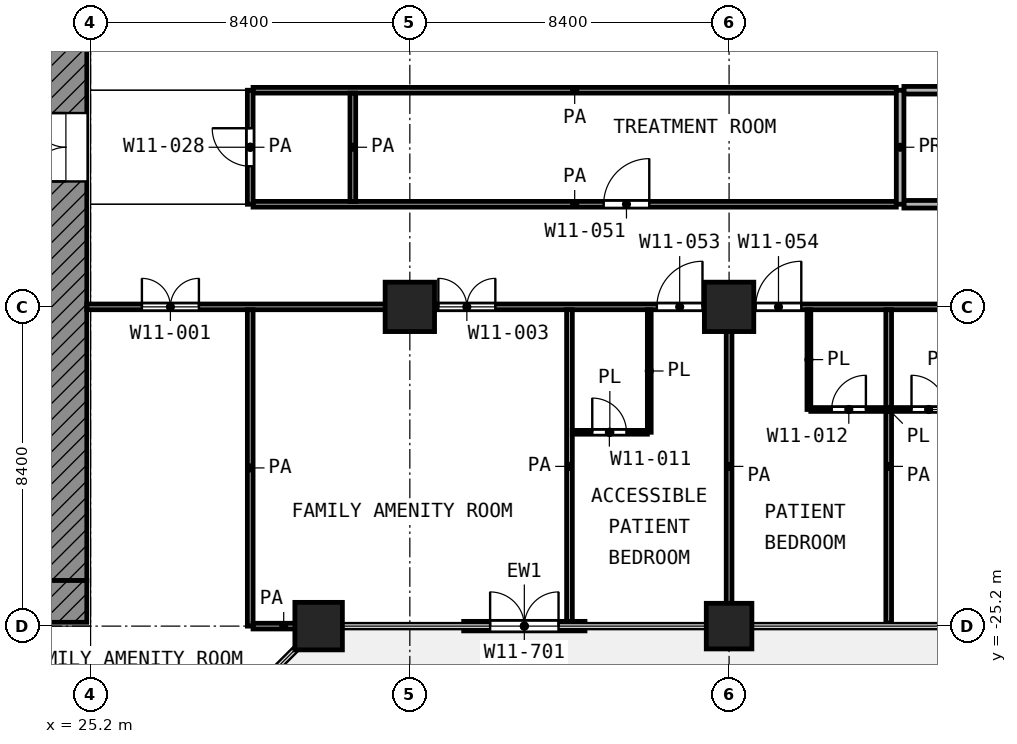
"""IFC4 building model, lengths in metres.
Left out: names, types, materials, properties, quantities, classifications, styles, units other than length and angle.
Written with IfcOpenShell. Run it as: python <this file> out.ifc"""

import sys

from ifc_helpers import new_model, si_unit, direction, frame, frame_2d, origin, origin_2d, place, context, subcontext, project, spatial, rectangle, extrude, element, fill, save


model = new_model("IFC4")
c1 = context("Model", 3, precision=1e-05, world=origin(), true_north=direction((0.0, 1.0)))
c2 = subcontext(c1, "Body", "Model", "MODEL_VIEW")
j1 = project(units=[si_unit("LENGTHUNIT", "METRE"), si_unit("PLANEANGLEUNIT", "RADIAN")], contexts=[c1])
p1 = place(None, origin())
s1 = spatial("IfcSite", under=j1, at=p1, CompositionType="ELEMENT")
p2 = place(p1, origin())
s2 = spatial("IfcBuilding", under=s1, at=p2, CompositionType="ELEMENT")
p3 = place(p2, frame((0.0, 0.0, 72.8)))
s3 = spatial("IfcBuildingStorey", under=s2, at=p3, CompositionType="ELEMENT", Elevation=72.8)
for number, where, z_axis, x_axis in (
    (1, (33.6, -16.8, 0.0), (0.0, 0.0, 1.0), (1.0, 0.0, 0.0)),
    (2, (42.0, -16.8, 0.0), (0.0, 0.0, 1.0), (1.0, 0.0, 0.0)),
):
    element("IfcColumn", number, at=place(p3, frame(where, z_axis=z_axis, x_axis=x_axis)), inside=s3, PredefinedType="COLUMN", context=c2, shape_type="SweptSolid", body=[
        extrude(rectangle(XDim=1.3, YDim=1.3, at=origin_2d()), origin(), (0.0, 0.0, 1.0), 4.2),
    ])
p4 = place(p3, frame((31.2, -25.2, 0.0), z_axis=(0.0, 0.0, 1.0), x_axis=(1.0, 0.0, 0.0)))
e3 = element("IfcColumn", 3, at=p4, inside=s3, PredefinedType="COLUMN", context=c2, shape_type="SweptSolid", body=[
    extrude(rectangle(XDim=1.25, YDim=1.25, at=origin_2d()), origin(), (0.0, 0.0, 1.0), 4.2),
])
p5 = place(p3, frame((42.0, -25.2, 0.0), z_axis=(0.0, 0.0, 1.0), x_axis=(1.0, 0.0, 0.0)))
e4 = element("IfcColumn", 4, at=p5, inside=s3, PredefinedType="COLUMN", context=c2, shape_type="SweptSolid", body=[
    extrude(rectangle(XDim=1.2, YDim=1.2, at=origin_2d()), origin(), (0.0, 0.0, 1.0), 4.2),
])
p6 = place(p3, frame((35.017, -25.2, 0.0), z_axis=(0.0, 0.0, 1.0), x_axis=(1.0, 0.0, 0.0)))
e5 = element("IfcWall", 5, at=p6, inside=s3, PredefinedType="SOLIDWALL", context=c2, shape_type="SweptSolid", body=[
    extrude(rectangle(XDim=3.192, YDim=0.25, at=frame_2d((1.596, 0.0))), origin(), (0.0, 0.0, 1.0), 3.78),
])
p7 = place(p6, frame((0.696, 0.0, 0.0)))
e6 = element("IfcOpeningElement", 6, at=p7, cuts=e5, PredefinedType="OPENING", context=c2, shape_type="SweptSolid", body=[
    extrude(rectangle(XDim=1.8, YDim=2.1, at=frame_2d((0.9, 1.05))), frame((0.0, 0.135, 0.0), z_axis=(0.0, -1.0, 0.0), x_axis=(1.0, 0.0, 0.0)), (0.0, 0.0, 1.0), 0.27),
])
p8 = place(p3, frame((24.55, -24.0, 0.0), z_axis=(0.0, 0.0, 1.0), x_axis=(0.0, 1.0, 0.0)))
e7 = element("IfcWall", 7, at=p8, inside=s3, PredefinedType="SHEAR", context=c2, shape_type="SweptSolid", body=[
    extrude(rectangle(XDim=18.6, YDim=1.1, at=frame_2d((9.3, 0.0))), origin(), (0.0, 0.0, 1.0), 3.9),
])
p9 = place(p8, frame((10.5, 0.0, 0.0)))
e8 = element("IfcOpeningElement", 8, at=p9, cuts=e7, PredefinedType="OPENING", context=c2, shape_type="SweptSolid", body=[
    extrude(rectangle(XDim=1.8, YDim=2.1, at=frame_2d((0.9, 1.05))), frame((0.0, 0.56, 0.0), z_axis=(0.0, -1.0, 0.0), x_axis=(1.0, 0.0, 0.0)), (0.0, 0.0, 1.0), 1.12),
])
p10 = place(p3, frame((24.55, -25.1, 0.0), z_axis=(0.0, 0.0, 1.0), x_axis=(0.0, 1.0, 0.0)))
e9 = element("IfcWall", 9, at=p10, inside=s3, PredefinedType="SHEAR", context=c2, shape_type="SweptSolid", body=[
    extrude(rectangle(XDim=1.1, YDim=1.1, at=frame_2d((0.55, 0.0))), origin(), (0.0, 0.0, 1.0), 3.9),
])
p11 = place(p3, frame((37.875, -20.1, 0.0), z_axis=(0.0, 0.0, 1.0), x_axis=(1.0, 0.0, 0.0)))
e10 = element("IfcWall", 10, at=p11, inside=s3, PredefinedType="PARTITIONING", context=c2, shape_type="SweptSolid", body=[
    extrude(rectangle(XDim=1.975, YDim=0.1, at=frame_2d((0.988, 0.0))), origin(), (0.0, 0.0, 1.0), 3.9),
])
p12 = place(p11, frame((0.525, 0.0, 0.0)))
e11 = element("IfcOpeningElement", 11, at=p12, cuts=e10, PredefinedType="OPENING", context=c2, shape_type="SweptSolid", body=[
    extrude(rectangle(XDim=0.9, YDim=2.1, at=frame_2d((0.45, 1.05))), frame((0.0, 0.06, 0.0), z_axis=(0.0, -1.0, 0.0), x_axis=(1.0, 0.0, 0.0)), (0.0, 0.0, 1.0), 0.12),
])
p13 = place(p3, frame((44.15, -19.5, 0.0), z_axis=(0.0, 0.0, 1.0), x_axis=(1.0, 0.0, 0.0)))
e12 = element("IfcWall", 12, at=p13, inside=s3, PredefinedType="PARTITIONING", context=c2, shape_type="SweptSolid", body=[
    extrude(rectangle(XDim=4.1, YDim=0.1, at=frame_2d((2.05, 0.0))), origin(), (0.0, 0.0, 1.0), 3.9),
])
p14 = place(p13, frame((0.55, 0.0, 0.0)))
e13 = element("IfcOpeningElement", 13, at=p14, cuts=e12, PredefinedType="OPENING", context=c2, shape_type="SweptSolid", body=[
    extrude(rectangle(XDim=0.9, YDim=2.1, at=frame_2d((0.45, 1.05))), frame((0.0, 0.06, 0.0), z_axis=(0.0, -1.0, 0.0), x_axis=(1.0, 0.0, 0.0)), (0.0, 0.0, 1.0), 0.12),
])
p15 = place(p13, frame((2.65, 0.0, 0.0)))
e14 = element("IfcOpeningElement", 14, at=p15, cuts=e12, PredefinedType="OPENING", context=c2, shape_type="SweptSolid", body=[
    extrude(rectangle(XDim=0.9, YDim=2.1, at=frame_2d((0.45, 1.05))), frame((0.0, 0.06, 0.0), z_axis=(0.0, -1.0, 0.0), x_axis=(1.0, 0.0, 0.0)), (0.0, 0.0, 1.0), 0.12),
])
p16 = place(p3, frame((39.9, -20.1, 0.0), z_axis=(0.0, 0.0, 1.0), x_axis=(0.0, 1.0, 0.0)))
e15 = element("IfcWall", 15, at=p16, inside=s3, PredefinedType="PARTITIONING", context=c2, shape_type="SweptSolid", body=[
    extrude(rectangle(XDim=3.225, YDim=0.1, at=frame_2d((1.613, 0.0))), origin(), (0.0, 0.0, 1.0), 3.9),
])
p17 = place(p3, frame((44.1, -19.5, 0.0), z_axis=(0.0, 0.0, 1.0), x_axis=(0.0, 1.0, 0.0)))
e16 = element("IfcWall", 16, at=p17, inside=s3, PredefinedType="PARTITIONING", context=c2, shape_type="SweptSolid", body=[
    extrude(rectangle(XDim=2.625, YDim=0.1, at=frame_2d((1.312, 0.0))), origin(), (0.0, 0.0, 1.0), 3.9),
])
p18 = place(p3, frame((29.475, -25.2, 0.0), z_axis=(0.0, 0.0, 1.0), x_axis=(1.0, 0.0, 0.0)))
e17 = element("IfcWall", 17, at=p18, inside=s3, PredefinedType="PARTITIONING", context=c2, shape_type="SweptSolid", body=[
    extrude(rectangle(XDim=1.612, YDim=0.15, at=frame_2d((0.806, 0.0))), origin(), (0.0, 0.0, 1.0), 3.9),
])
p19 = place(p3, frame((25.1, -16.8, 0.0), z_axis=(0.0, 0.0, 1.0), x_axis=(1.0, 0.0, 0.0)))
e18 = element("IfcWall", 18, at=p19, inside=s3, PredefinedType="PARTITIONING", context=c2, shape_type="SweptSolid", body=[
    extrude(rectangle(XDim=54.62, YDim=0.15, at=frame_2d((27.31, 0.0))), origin(), (0.0, 0.0, 1.0), 3.9),
])
p20 = place(p19, frame((1.45, 0.0, 0.0)))
e19 = element("IfcOpeningElement", 19, at=p20, cuts=e18, PredefinedType="OPENING", context=c2, shape_type="SweptSolid", body=[
    extrude(rectangle(XDim=1.5, YDim=2.1, at=frame_2d((0.75, 1.05))), frame((0.0, 0.085, 0.0), z_axis=(0.0, -1.0, 0.0), x_axis=(1.0, 0.0, 0.0)), (0.0, 0.0, 1.0), 0.17),
])
p21 = place(p19, frame((9.25, 0.0, 0.0)))
e20 = element("IfcOpeningElement", 20, at=p21, cuts=e18, PredefinedType="OPENING", context=c2, shape_type="SweptSolid", body=[
    extrude(rectangle(XDim=1.5, YDim=2.1, at=frame_2d((0.75, 1.05))), frame((0.0, 0.085, 0.0), z_axis=(0.0, -1.0, 0.0), x_axis=(1.0, 0.0, 0.0)), (0.0, 0.0, 1.0), 0.17),
])
p22 = place(p19, frame((15.0, 0.0, 0.0)))
e21 = element("IfcOpeningElement", 21, at=p22, cuts=e18, PredefinedType="OPENING", context=c2, shape_type="SweptSolid", body=[
    extrude(rectangle(XDim=1.2, YDim=2.1, at=frame_2d((0.6, 1.05))), frame((0.0, 0.085, 0.0), z_axis=(0.0, -1.0, 0.0), x_axis=(1.0, 0.0, 0.0)), (0.0, 0.0, 1.0), 0.17),
])
p23 = place(p19, frame((17.6, 0.0, 0.0)))
e22 = element("IfcOpeningElement", 22, at=p23, cuts=e18, PredefinedType="OPENING", context=c2, shape_type="SweptSolid", body=[
    extrude(rectangle(XDim=1.2, YDim=2.1, at=frame_2d((0.6, 1.05))), frame((0.0, 0.085, 0.0), z_axis=(0.0, -1.0, 0.0), x_axis=(1.0, 0.0, 0.0)), (0.0, 0.0, 1.0), 0.17),
])
p24 = place(p19, frame((26.2, 0.0, 0.0)))
e23 = element("IfcOpeningElement", 23, at=p24, cuts=e18, PredefinedType="OPENING", context=c2, shape_type="SweptSolid", body=[
    extrude(rectangle(XDim=1.2, YDim=2.1, at=frame_2d((0.6, 1.05))), frame((0.0, 0.085, 0.0), z_axis=(0.0, -1.0, 0.0), x_axis=(1.0, 0.0, 0.0)), (0.0, 0.0, 1.0), 0.17),
])
p25 = place(p19, frame((23.4, 0.0, 0.0)))
e24 = element("IfcOpeningElement", 24, at=p25, cuts=e18, PredefinedType="OPENING", context=c2, shape_type="SweptSolid", body=[
    extrude(rectangle(XDim=1.2, YDim=2.1, at=frame_2d((0.6, 1.05))), frame((0.0, 0.085, 0.0), z_axis=(0.0, -1.0, 0.0), x_axis=(1.0, 0.0, 0.0)), (0.0, 0.0, 1.0), 0.17),
])
p26 = place(p19, frame((28.45, 0.0, 0.0)))
e25 = element("IfcOpeningElement", 25, at=p26, cuts=e18, PredefinedType="OPENING", context=c2, shape_type="SweptSolid", body=[
    extrude(rectangle(XDim=1.2, YDim=2.1, at=frame_2d((0.6, 1.05))), frame((0.0, 0.085, 0.0), z_axis=(0.0, -1.0, 0.0), x_axis=(1.0, 0.0, 0.0)), (0.0, 0.0, 1.0), 0.17),
])
p27 = place(p19, frame((31.8, 0.0, 0.0)))
e26 = element("IfcOpeningElement", 26, at=p27, cuts=e18, PredefinedType="OPENING", context=c2, shape_type="SweptSolid", body=[
    extrude(rectangle(XDim=1.2, YDim=2.1, at=frame_2d((0.6, 1.05))), frame((0.0, 0.085, 0.0), z_axis=(0.0, -1.0, 0.0), x_axis=(1.0, 0.0, 0.0)), (0.0, 0.0, 1.0), 0.17),
])
p28 = place(p19, frame((30.35, 0.0, 0.0)))
e27 = element("IfcOpeningElement", 27, at=p28, cuts=e18, PredefinedType="OPENING", context=c2, shape_type="SweptSolid", body=[
    extrude(rectangle(XDim=1.1, YDim=2.1, at=frame_2d((0.55, 1.05))), frame((0.0, 0.085, 0.0), z_axis=(0.0, -1.0, 0.0), x_axis=(1.0, 0.0, 0.0)), (0.0, 0.0, 1.0), 0.17),
])
p29 = place(p19, frame((40.2, 0.0, 0.0)))
e28 = element("IfcOpeningElement", 28, at=p29, cuts=e18, PredefinedType="OPENING", context=c2, shape_type="SweptSolid", body=[
    extrude(rectangle(XDim=1.2, YDim=2.1, at=frame_2d((0.6, 1.05))), frame((0.0, 0.085, 0.0), z_axis=(0.0, -1.0, 0.0), x_axis=(1.0, 0.0, 0.0)), (0.0, 0.0, 1.0), 0.17),
])
p30 = place(p19, frame((43.1, 0.0, 0.0)))
e29 = element("IfcOpeningElement", 29, at=p30, cuts=e18, PredefinedType="OPENING", context=c2, shape_type="SweptSolid", body=[
    extrude(rectangle(XDim=1.2, YDim=2.1, at=frame_2d((0.6, 1.05))), frame((0.0, 0.085, 0.0), z_axis=(0.0, -1.0, 0.0), x_axis=(1.0, 0.0, 0.0)), (0.0, 0.0, 1.0), 0.17),
])
p31 = place(p19, frame((51.2, 0.0, 0.0)))
e30 = element("IfcOpeningElement", 30, at=p31, cuts=e18, PredefinedType="OPENING", context=c2, shape_type="SweptSolid", body=[
    extrude(rectangle(XDim=1.5, YDim=2.1, at=frame_2d((0.75, 1.05))), frame((0.0, 0.085, 0.0), z_axis=(0.0, -1.0, 0.0), x_axis=(1.0, 0.0, 0.0)), (0.0, 0.0, 1.0), 0.17),
])
p32 = place(p3, frame((29.475, -14.1, 0.0), z_axis=(0.0, 0.0, 1.0), x_axis=(1.0, 0.0, 0.0)))
e31 = element("IfcWall", 31, at=p32, inside=s3, PredefinedType="PARTITIONING", context=c2, shape_type="SweptSolid", body=[
    extrude(rectangle(XDim=16.925, YDim=0.15, at=frame_2d((8.462, 0.0))), origin(), (0.0, 0.0, 1.0), 3.9),
])
p33 = place(p32, frame((9.225, 0.0, 0.0)))
e32 = element("IfcOpeningElement", 32, at=p33, cuts=e31, PredefinedType="OPENING", context=c2, shape_type="SweptSolid", body=[
    extrude(rectangle(XDim=1.2, YDim=2.1, at=frame_2d((0.6, 1.05))), frame((0.0, 0.085, 0.0), z_axis=(0.0, -1.0, 0.0), x_axis=(1.0, 0.0, 0.0)), (0.0, 0.0, 1.0), 0.17),
])
p34 = place(p3, frame((29.475, -11.1, 0.0), z_axis=(0.0, 0.0, 1.0), x_axis=(1.0, 0.0, 0.0)))
e33 = element("IfcWall", 33, at=p34, inside=s3, PredefinedType="PARTITIONING", context=c2, shape_type="SweptSolid", body=[
    extrude(rectangle(XDim=16.925, YDim=0.15, at=frame_2d((8.462, 0.0))), origin(), (0.0, 0.0, 1.0), 3.9),
])
p35 = place(p3, frame((29.4, -25.2, 0.0), z_axis=(0.0, 0.0, 1.0), x_axis=(0.0, 1.0, 0.0)))
e34 = element("IfcWall", 34, at=p35, inside=s3, PredefinedType="PARTITIONING", context=c2, shape_type="SweptSolid", body=[
    extrude(rectangle(XDim=8.325, YDim=0.15, at=frame_2d((4.163, 0.0))), origin(), (0.0, 0.0, 1.0), 3.9),
])
p36 = place(p3, frame((29.4, -14.1, 0.0), z_axis=(0.0, 0.0, 1.0), x_axis=(0.0, 1.0, 0.0)))
e35 = element("IfcWall", 35, at=p36, inside=s3, PredefinedType="PARTITIONING", context=c2, shape_type="SweptSolid", body=[
    extrude(rectangle(XDim=3.0, YDim=0.15, at=frame_2d((1.5, 0.0))), origin(), (0.0, 0.0, 1.0), 3.9),
])
p37 = place(p36, frame((1.0, 0.0, 0.0)))
e36 = element("IfcOpeningElement", 36, at=p37, cuts=e35, PredefinedType="OPENING", context=c2, shape_type="SweptSolid", body=[
    extrude(rectangle(XDim=1.0, YDim=2.1, at=frame_2d((0.5, 1.05))), frame((0.0, 0.085, 0.0), z_axis=(0.0, -1.0, 0.0), x_axis=(1.0, 0.0, 0.0)), (0.0, 0.0, 1.0), 0.17),
])
p38 = place(p3, frame((32.1, -14.025, 0.0), z_axis=(0.0, 0.0, 1.0), x_axis=(0.0, 1.0, 0.0)))
e37 = element("IfcWall", 37, at=p38, inside=s3, PredefinedType="PARTITIONING", context=c2, shape_type="SweptSolid", body=[
    extrude(rectangle(XDim=2.85, YDim=0.15, at=frame_2d((1.425, 0.0))), origin(), (0.0, 0.0, 1.0), 3.9),
])
for number, where, z_axis, x_axis in (
    (38, (37.8, -25.12, 0.0), (0.0, 0.0, 1.0), (0.0, 1.0, 0.0)),
    (39, (42.0, -25.12, 0.0), (0.0, 0.0, 1.0), (0.0, 1.0, 0.0)),
    (40, (46.2, -25.12, 0.0), (0.0, 0.0, 1.0), (0.0, 1.0, 0.0)),
):
    element("IfcWall", number, at=place(p3, frame(where, z_axis=z_axis, x_axis=x_axis)), inside=s3, PredefinedType="PARTITIONING", context=c2, shape_type="SweptSolid", body=[
        extrude(rectangle(XDim=8.245, YDim=0.15, at=frame_2d((4.123, 0.0))), origin(), (0.0, 0.0, 1.0), 3.9),
    ])
p39 = place(p3, frame((46.6, -14.1, 0.0), z_axis=(0.0, 0.0, 1.0), x_axis=(1.0, 0.0, 0.0)))
e41 = element("IfcWall", 41, at=p39, inside=s3, PredefinedType="PARTITIONING", context=c2, shape_type="SweptSolid", body=[
    extrude(rectangle(XDim=12.1, YDim=0.2, at=frame_2d((6.05, 0.0))), origin(), (0.0, 0.0, 1.0), 3.9),
])
p40 = place(p3, frame((46.6, -11.1, 0.0), z_axis=(0.0, 0.0, 1.0), x_axis=(1.0, 0.0, 0.0)))
e42 = element("IfcWall", 42, at=p40, inside=s3, PredefinedType="PARTITIONING", context=c2, shape_type="SweptSolid", body=[
    extrude(rectangle(XDim=12.1, YDim=0.2, at=frame_2d((6.05, 0.0))), origin(), (0.0, 0.0, 1.0), 3.9),
])
p41 = place(p40, frame((5.45, 0.0, 0.0)))
e43 = element("IfcOpeningElement", 43, at=p41, cuts=e42, PredefinedType="OPENING", context=c2, shape_type="SweptSolid", body=[
    extrude(rectangle(XDim=1.2, YDim=2.1, at=frame_2d((0.6, 1.05))), frame((0.0, 0.11, 0.0), z_axis=(0.0, -1.0, 0.0), x_axis=(1.0, 0.0, 0.0)), (0.0, 0.0, 1.0), 0.22),
])
p42 = place(p3, frame((46.5, -14.1, 0.0), z_axis=(0.0, 0.0, 1.0), x_axis=(0.0, 1.0, 0.0)))
e44 = element("IfcWall", 44, at=p42, inside=s3, PredefinedType="PARTITIONING", context=c2, shape_type="SweptSolid", body=[
    extrude(rectangle(XDim=3.0, YDim=0.2, at=frame_2d((1.5, 0.0))), origin(), (0.0, 0.0, 1.0), 3.9),
])
p43 = place(p7, origin())
e45 = element("IfcDoor", 45, at=p43, inside=s3, OperationType="DOUBLE_DOOR_SINGLE_SWING", PredefinedType="DOOR", context=c2, shape_type="SweptSolid", body=[
    extrude(rectangle(XDim=1.8, YDim=2.1, at=frame_2d((0.9, 1.05))), frame((0.0, 0.025, 0.0), z_axis=(0.0, -1.0, 0.0), x_axis=(1.0, 0.0, 0.0)), (0.0, 0.0, 1.0), 0.05),
])
fill(e6, e45)
p44 = place(p9, origin())
e46 = element("IfcDoor", 46, at=p44, inside=s3, OperationType="DOUBLE_DOOR_SINGLE_SWING", PredefinedType="DOOR", context=c2, shape_type="SweptSolid", body=[
    extrude(rectangle(XDim=1.8, YDim=2.1, at=frame_2d((0.9, 1.05))), frame((0.0, 0.025, 0.0), z_axis=(0.0, -1.0, 0.0), x_axis=(1.0, 0.0, 0.0)), (0.0, 0.0, 1.0), 0.05),
])
fill(e8, e46)
p45 = place(p20, origin())
e47 = element("IfcDoor", 47, at=p45, inside=s3, OperationType="DOUBLE_DOOR_SINGLE_SWING", PredefinedType="DOOR", context=c2, shape_type="SweptSolid", body=[
    extrude(rectangle(XDim=1.5, YDim=2.1, at=frame_2d((0.75, 1.05))), frame((0.0, 0.025, 0.0), z_axis=(0.0, -1.0, 0.0), x_axis=(1.0, 0.0, 0.0)), (0.0, 0.0, 1.0), 0.05),
])
fill(e19, e47)
p46 = place(p33, origin())
e48 = element("IfcDoor", 48, at=p46, inside=s3, OperationType="SINGLE_SWING_RIGHT", PredefinedType="DOOR", context=c2, shape_type="SweptSolid", body=[
    extrude(rectangle(XDim=1.2, YDim=2.1, at=frame_2d((0.6, 1.05))), frame((0.0, 0.025, 0.0), z_axis=(0.0, -1.0, 0.0), x_axis=(1.0, 0.0, 0.0)), (0.0, 0.0, 1.0), 0.05),
])
fill(e32, e48)
p47 = place(p21, origin())
e49 = element("IfcDoor", 49, at=p47, inside=s3, OperationType="DOUBLE_DOOR_SINGLE_SWING", PredefinedType="DOOR", context=c2, shape_type="SweptSolid", body=[
    extrude(rectangle(XDim=1.5, YDim=2.1, at=frame_2d((0.75, 1.05))), frame((0.0, 0.025, 0.0), z_axis=(0.0, -1.0, 0.0), x_axis=(1.0, 0.0, 0.0)), (0.0, 0.0, 1.0), 0.05),
])
fill(e20, e49)
p48 = place(p22, origin())
e50 = element("IfcDoor", 50, at=p48, inside=s3, OperationType="SINGLE_SWING_RIGHT", PredefinedType="DOOR", context=c2, shape_type="SweptSolid", body=[
    extrude(rectangle(XDim=1.2, YDim=2.1, at=frame_2d((0.6, 1.05))), frame((0.0, 0.025, 0.0), z_axis=(0.0, -1.0, 0.0), x_axis=(1.0, 0.0, 0.0)), (0.0, 0.0, 1.0), 0.05),
])
fill(e21, e50)
p49 = place(p12, origin())
e51 = element("IfcDoor", 51, at=p49, inside=s3, OperationType="SINGLE_SWING_LEFT", PredefinedType="DOOR", context=c2, shape_type="SweptSolid", body=[
    extrude(rectangle(XDim=0.9, YDim=2.1, at=frame_2d((0.45, 1.05))), frame((0.0, 0.025, 0.0), z_axis=(0.0, -1.0, 0.0), x_axis=(1.0, 0.0, 0.0)), (0.0, 0.0, 1.0), 0.05),
])
fill(e11, e51)
p50 = place(p23, origin())
e52 = element("IfcDoor", 52, at=p50, inside=s3, OperationType="SINGLE_SWING_RIGHT", PredefinedType="DOOR", context=c2, shape_type="SweptSolid", body=[
    extrude(rectangle(XDim=1.2, YDim=2.1, at=frame_2d((0.6, 1.05))), frame((0.0, 0.025, 0.0), z_axis=(0.0, -1.0, 0.0), x_axis=(1.0, 0.0, 0.0)), (0.0, 0.0, 1.0), 0.05),
])
fill(e22, e52)
p51 = place(p14, origin())
e53 = element("IfcDoor", 53, at=p51, inside=s3, OperationType="SINGLE_SWING_RIGHT", PredefinedType="DOOR", context=c2, shape_type="SweptSolid", body=[
    extrude(rectangle(XDim=0.9, YDim=2.1, at=frame_2d((0.45, 1.05))), frame((0.0, 0.025, 0.0), z_axis=(0.0, -1.0, 0.0), x_axis=(1.0, 0.0, 0.0)), (0.0, 0.0, 1.0), 0.05),
])
fill(e13, e53)
p52 = place(p15, origin())
e54 = element("IfcDoor", 54, at=p52, inside=s3, OperationType="SINGLE_SWING_LEFT", PredefinedType="DOOR", context=c2, shape_type="SweptSolid", body=[
    extrude(rectangle(XDim=0.9, YDim=2.1, at=frame_2d((0.45, 1.05))), frame((0.0, 0.025, 0.0), z_axis=(0.0, -1.0, 0.0), x_axis=(1.0, 0.0, 0.0)), (0.0, 0.0, 1.0), 0.05),
])
fill(e14, e54)
p53 = place(p37, origin())
e55 = element("IfcDoor", 55, at=p53, inside=s3, OperationType="SINGLE_SWING_RIGHT", PredefinedType="DOOR", context=c2, shape_type="SweptSolid", body=[
    extrude(rectangle(XDim=1.0, YDim=2.1, at=frame_2d((0.5, 1.05))), frame((0.0, 0.025, 0.0), z_axis=(0.0, -1.0, 0.0), x_axis=(1.0, 0.0, 0.0)), (0.0, 0.0, 1.0), 0.05),
])
fill(e36, e55)
save(model, sys.argv[1])
